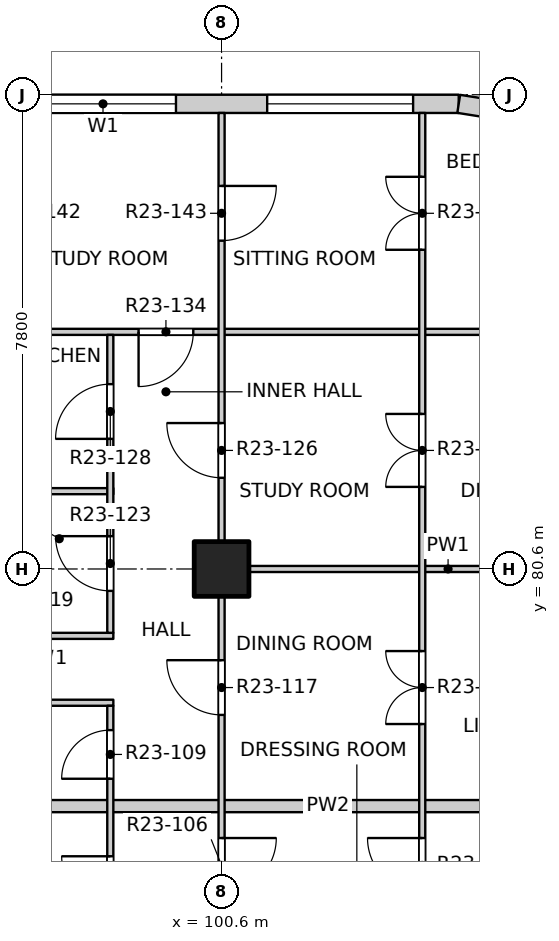
"""IFC4 building model, lengths in metres.
Left out: names, types, materials, properties, quantities, classifications, styles, units other than length and angle.
Written with IfcOpenShell. Run it as: python <this file> out.ifc"""

import sys

from ifc_helpers import new_model, si_unit, direction, frame, frame_2d, origin, origin_2d, place, context, subcontext, project, spatial, rectangle, extrude, element, fill, save


model = new_model("IFC4")
c1 = context("Model", 3, precision=1e-05, world=origin(), true_north=direction((0.0, 1.0)))
c2 = subcontext(c1, "Body", "Model", "MODEL_VIEW")
j1 = project(units=[si_unit("LENGTHUNIT", "METRE"), si_unit("PLANEANGLEUNIT", "RADIAN")], contexts=[c1])
p1 = place(None, origin())
s1 = spatial("IfcSite", under=j1, at=p1, CompositionType="ELEMENT")
p2 = place(p1, origin())
s2 = spatial("IfcBuilding", under=s1, at=p2, CompositionType="ELEMENT")
p3 = place(p2, frame((0.0, 0.0, 238.1)))
s3 = spatial("IfcBuildingStorey", under=s2, at=p3, CompositionType="ELEMENT", Elevation=238.1)
p4 = place(p3, frame((100.6, 80.6, -0.25), z_axis=(0.0, 0.0, 1.0), x_axis=(1.0, 0.0, 0.0)))
e1 = element("IfcColumn", 1, at=p4, inside=s3, PredefinedType="COLUMN", context=c2, shape_type="SweptSolid", body=[
    extrude(rectangle(XDim=0.9, YDim=0.9, at=origin_2d()), origin(), (0.0, 0.0, 1.0), 3.35),
])
p5 = place(p3, frame((97.1, 88.25, 0.0), z_axis=(0.0, 0.0, 1.0), x_axis=(1.0, 0.0, 0.0)))
e2 = element("IfcWall", 2, at=p5, inside=s3, PredefinedType="SOLIDWALL", context=c2, shape_type="SweptSolid", body=[
    extrude(rectangle(XDim=7.4, YDim=0.3, at=frame_2d((3.7, 0.0))), origin(), (0.0, 0.0, 1.0), 3.1),
])
p6 = place(p5, frame((0.35, 0.0, 0.9)))
e3 = element("IfcOpeningElement", 3, at=p6, cuts=e2, PredefinedType="OPENING", context=c2, shape_type="SweptSolid", body=[
    extrude(rectangle(XDim=2.4, YDim=1.8, at=frame_2d((1.2, 0.9))), frame((0.0, 0.16, 0.0), z_axis=(0.0, -1.0, 0.0), x_axis=(1.0, 0.0, 0.0)), (0.0, 0.0, 1.0), 0.32),
])
p7 = place(p5, frame((4.25, 0.0, 0.9)))
e4 = element("IfcOpeningElement", 4, at=p7, cuts=e2, PredefinedType="OPENING", context=c2, shape_type="SweptSolid", body=[
    extrude(rectangle(XDim=2.4, YDim=1.8, at=frame_2d((1.2, 0.9))), frame((0.0, 0.16, 0.0), z_axis=(0.0, -1.0, 0.0), x_axis=(1.0, 0.0, 0.0)), (0.0, 0.0, 1.0), 0.32),
])
p8 = place(p3, frame((105.659, 88.066, 0.0), z_axis=(0.0, 0.0, 1.0), x_axis=(-0.987678452879, 0.156496880861, 0.0)))
e5 = element("IfcWall", 5, at=p8, inside=s3, PredefinedType="SOLIDWALL", context=c2, shape_type="SweptSolid", body=[
    extrude(rectangle(XDim=1.173, YDim=0.3, at=frame_2d((0.586, 0.0))), origin(), (0.0, 0.0, 1.0), 3.1),
])
p9 = place(p3, frame((96.6, 76.7, 0.0), z_axis=(0.0, 0.0, 1.0), x_axis=(1.0, 0.0, 0.0)))
e6 = element("IfcWall", 6, at=p9, inside=s3, PredefinedType="PARTITIONING", context=c2, shape_type="SweptSolid", body=[
    extrude(rectangle(XDim=11.5, YDim=0.2, at=frame_2d((5.75, 0.0))), origin(), (0.0, 0.0, 1.0), 3.1),
])
for number, where, z_axis, x_axis in (
    (7, (96.6, 78.4, 0.0), (0.0, 0.0, 1.0), (1.0, 0.0, 0.0)),
    (8, (96.6, 79.5, 0.0), (0.0, 0.0, 1.0), (1.0, 0.0, 0.0)),
):
    element("IfcWall", number, at=place(p3, frame(where, z_axis=z_axis, x_axis=x_axis)), inside=s3, PredefinedType="PARTITIONING", context=c2, shape_type="SweptSolid", body=[
        extrude(rectangle(XDim=2.22, YDim=0.1, at=frame_2d((1.11, 0.0))), origin(), (0.0, 0.0, 1.0), 3.1),
    ])
p10 = place(p3, frame((100.55, 80.6, 0.0), z_axis=(0.0, 0.0, 1.0), x_axis=(1.0, 0.0, 0.0)))
e9 = element("IfcWall", 9, at=p10, inside=s3, PredefinedType="PARTITIONING", context=c2, shape_type="SweptSolid", body=[
    extrude(rectangle(XDim=7.55, YDim=0.1, at=frame_2d((3.775, 0.0))), origin(), (0.0, 0.0, 1.0), 3.1),
])
p11 = place(p3, frame((96.6, 81.88, 0.0), z_axis=(0.0, 0.0, 1.0), x_axis=(1.0, 0.0, 0.0)))
e10 = element("IfcWall", 10, at=p11, inside=s3, PredefinedType="PARTITIONING", context=c2, shape_type="SweptSolid", body=[
    extrude(rectangle(XDim=2.22, YDim=0.1, at=frame_2d((1.11, 0.0))), origin(), (0.0, 0.0, 1.0), 3.1),
])
p12 = place(p3, frame((96.6, 84.5, 0.0), z_axis=(0.0, 0.0, 1.0), x_axis=(1.0, 0.0, 0.0)))
e11 = element("IfcWall", 11, at=p12, inside=s3, PredefinedType="PARTITIONING", context=c2, shape_type="SweptSolid", body=[
    extrude(rectangle(XDim=11.5, YDim=0.1, at=frame_2d((5.75, 0.0))), origin(), (0.0, 0.0, 1.0), 3.1),
])
p13 = place(p12, frame((2.635, 0.0, 0.0)))
e12 = element("IfcOpeningElement", 12, at=p13, cuts=e11, PredefinedType="OPENING", context=c2, shape_type="SweptSolid", body=[
    extrude(rectangle(XDim=0.9, YDim=2.1, at=frame_2d((0.45, 1.05))), frame((0.0, 0.06, 0.0), z_axis=(0.0, -1.0, 0.0), x_axis=(1.0, 0.0, 0.0)), (0.0, 0.0, 1.0), 0.12),
])
p14 = place(p3, frame((98.77, 64.0, 0.0), z_axis=(0.0, 0.0, 1.0), x_axis=(0.0, 1.0, 0.0)))
e13 = element("IfcWall", 13, at=p14, inside=s3, PredefinedType="PARTITIONING", context=c2, shape_type="SweptSolid", body=[
    extrude(rectangle(XDim=14.35, YDim=0.1, at=frame_2d((7.175, 0.0))), origin(), (0.0, 0.0, 1.0), 3.1),
])
p15 = place(p14, frame((0.815, 0.0, 0.0)))
e14 = element("IfcOpeningElement", 14, at=p15, cuts=e13, PredefinedType="OPENING", context=c2, shape_type="SweptSolid", body=[
    extrude(rectangle(XDim=0.8, YDim=2.1, at=frame_2d((0.4, 1.05))), frame((0.0, 0.06, 0.0), z_axis=(0.0, -1.0, 0.0), x_axis=(1.0, 0.0, 0.0)), (0.0, 0.0, 1.0), 0.12),
])
p16 = place(p14, frame((3.23, 0.0, 0.0)))
e15 = element("IfcOpeningElement", 15, at=p16, cuts=e13, PredefinedType="OPENING", context=c2, shape_type="SweptSolid", body=[
    extrude(rectangle(XDim=0.9, YDim=2.1, at=frame_2d((0.45, 1.05))), frame((0.0, 0.06, 0.0), z_axis=(0.0, -1.0, 0.0), x_axis=(1.0, 0.0, 0.0)), (0.0, 0.0, 1.0), 0.12),
])
p17 = place(p14, frame((5.63, 0.0, 0.0)))
e16 = element("IfcOpeningElement", 16, at=p17, cuts=e13, PredefinedType="OPENING", context=c2, shape_type="SweptSolid", body=[
    extrude(rectangle(XDim=0.8, YDim=2.1, at=frame_2d((0.4, 1.05))), frame((0.0, 0.06, 0.0), z_axis=(0.0, -1.0, 0.0), x_axis=(1.0, 0.0, 0.0)), (0.0, 0.0, 1.0), 0.12),
])
p18 = place(p14, frame((8.265, 0.0, 0.0)))
e17 = element("IfcOpeningElement", 17, at=p18, cuts=e13, PredefinedType="OPENING", context=c2, shape_type="SweptSolid", body=[
    extrude(rectangle(XDim=0.9, YDim=2.1, at=frame_2d((0.45, 1.05))), frame((0.0, 0.06, 0.0), z_axis=(0.0, -1.0, 0.0), x_axis=(1.0, 0.0, 0.0)), (0.0, 0.0, 1.0), 0.12),
])
p19 = place(p14, frame((11.075, 0.0, 0.0)))
e18 = element("IfcOpeningElement", 18, at=p19, cuts=e13, PredefinedType="OPENING", context=c2, shape_type="SweptSolid", body=[
    extrude(rectangle(XDim=0.8, YDim=2.1, at=frame_2d((0.4, 1.05))), frame((0.0, 0.06, 0.0), z_axis=(0.0, -1.0, 0.0), x_axis=(1.0, 0.0, 0.0)), (0.0, 0.0, 1.0), 0.12),
])
p20 = place(p14, frame((13.15, 0.0, 0.0)))
e19 = element("IfcOpeningElement", 19, at=p20, cuts=e13, PredefinedType="OPENING", context=c2, shape_type="SweptSolid", body=[
    extrude(rectangle(XDim=0.8, YDim=2.1, at=frame_2d((0.4, 1.05))), frame((0.0, 0.06, 0.0), z_axis=(0.0, -1.0, 0.0), x_axis=(1.0, 0.0, 0.0)), (0.0, 0.0, 1.0), 0.12),
])
p21 = place(p3, frame((98.77, 79.55, 0.0), z_axis=(0.0, 0.0, 1.0), x_axis=(0.0, 1.0, 0.0)))
e20 = element("IfcWall", 20, at=p21, inside=s3, PredefinedType="PARTITIONING", context=c2, shape_type="SweptSolid", body=[
    extrude(rectangle(XDim=4.9, YDim=0.1, at=frame_2d((2.45, 0.0))), origin(), (0.0, 0.0, 1.0), 3.1),
])
p22 = place(p21, frame((0.69, 0.0, 0.0)))
e21 = element("IfcOpeningElement", 21, at=p22, cuts=e20, PredefinedType="OPENING", context=c2, shape_type="SweptSolid", body=[
    extrude(rectangle(XDim=0.9, YDim=2.1, at=frame_2d((0.45, 1.05))), frame((0.0, 0.06, 0.0), z_axis=(0.0, -1.0, 0.0), x_axis=(1.0, 0.0, 0.0)), (0.0, 0.0, 1.0), 0.12),
])
p23 = place(p21, frame((3.19, 0.0, 0.0)))
e22 = element("IfcOpeningElement", 22, at=p23, cuts=e20, PredefinedType="OPENING", context=c2, shape_type="SweptSolid", body=[
    extrude(rectangle(XDim=0.9, YDim=2.1, at=frame_2d((0.45, 1.05))), frame((0.0, 0.06, 0.0), z_axis=(0.0, -1.0, 0.0), x_axis=(1.0, 0.0, 0.0)), (0.0, 0.0, 1.0), 0.12),
])
p24 = place(p3, frame((100.6, 41.9, 0.0), z_axis=(0.0, 0.0, 1.0), x_axis=(0.0, 1.0, 0.0)))
e23 = element("IfcWall", 23, at=p24, inside=s3, PredefinedType="PARTITIONING", context=c2, shape_type="SweptSolid", body=[
    extrude(rectangle(XDim=46.2, YDim=0.1, at=frame_2d((23.1, 0.0))), origin(), (0.0, 0.0, 1.0), 3.1),
])
p25 = place(p24, frame((1.2, 0.0, 0.0)))
e24 = element("IfcOpeningElement", 24, at=p25, cuts=e23, PredefinedType="OPENING", context=c2, shape_type="SweptSolid", body=[
    extrude(rectangle(XDim=0.9, YDim=2.1, at=frame_2d((0.45, 1.05))), frame((0.0, 0.06, 0.0), z_axis=(0.0, -1.0, 0.0), x_axis=(1.0, 0.0, 0.0)), (0.0, 0.0, 1.0), 0.12),
])
p26 = place(p24, frame((6.025, 0.0, 0.0)))
e25 = element("IfcOpeningElement", 25, at=p26, cuts=e23, PredefinedType="OPENING", context=c2, shape_type="SweptSolid", body=[
    extrude(rectangle(XDim=0.9, YDim=2.1, at=frame_2d((0.45, 1.05))), frame((0.0, 0.06, 0.0), z_axis=(0.0, -1.0, 0.0), x_axis=(1.0, 0.0, 0.0)), (0.0, 0.0, 1.0), 0.12),
])
p27 = place(p24, frame((9.975, 0.0, 0.0)))
e26 = element("IfcOpeningElement", 26, at=p27, cuts=e23, PredefinedType="OPENING", context=c2, shape_type="SweptSolid", body=[
    extrude(rectangle(XDim=0.9, YDim=2.1, at=frame_2d((0.45, 1.05))), frame((0.0, 0.06, 0.0), z_axis=(0.0, -1.0, 0.0), x_axis=(1.0, 0.0, 0.0)), (0.0, 0.0, 1.0), 0.12),
])
p28 = place(p24, frame((12.9, 0.0, 0.0)))
e27 = element("IfcOpeningElement", 27, at=p28, cuts=e23, PredefinedType="OPENING", context=c2, shape_type="SweptSolid", body=[
    extrude(rectangle(XDim=0.9, YDim=2.1, at=frame_2d((0.45, 1.05))), frame((0.0, 0.06, 0.0), z_axis=(0.0, -1.0, 0.0), x_axis=(1.0, 0.0, 0.0)), (0.0, 0.0, 1.0), 0.12),
])
p29 = place(p24, frame((17.775, 0.0, 0.0)))
e28 = element("IfcOpeningElement", 28, at=p29, cuts=e23, PredefinedType="OPENING", context=c2, shape_type="SweptSolid", body=[
    extrude(rectangle(XDim=0.9, YDim=2.1, at=frame_2d((0.45, 1.05))), frame((0.0, 0.06, 0.0), z_axis=(0.0, -1.0, 0.0), x_axis=(1.0, 0.0, 0.0)), (0.0, 0.0, 1.0), 0.12),
])
p30 = place(p24, frame((21.625, 0.0, 0.0)))
e29 = element("IfcOpeningElement", 29, at=p30, cuts=e23, PredefinedType="OPENING", context=c2, shape_type="SweptSolid", body=[
    extrude(rectangle(XDim=0.9, YDim=2.1, at=frame_2d((0.45, 1.05))), frame((0.0, 0.06, 0.0), z_axis=(0.0, -1.0, 0.0), x_axis=(1.0, 0.0, 0.0)), (0.0, 0.0, 1.0), 0.12),
])
p31 = place(p24, frame((25.575, 0.0, 0.0)))
e30 = element("IfcOpeningElement", 30, at=p31, cuts=e23, PredefinedType="OPENING", context=c2, shape_type="SweptSolid", body=[
    extrude(rectangle(XDim=0.9, YDim=2.1, at=frame_2d((0.45, 1.05))), frame((0.0, 0.06, 0.0), z_axis=(0.0, -1.0, 0.0), x_axis=(1.0, 0.0, 0.0)), (0.0, 0.0, 1.0), 0.12),
])
p32 = place(p24, frame((28.5, 0.0, 0.0)))
e31 = element("IfcOpeningElement", 31, at=p32, cuts=e23, PredefinedType="OPENING", context=c2, shape_type="SweptSolid", body=[
    extrude(rectangle(XDim=0.9, YDim=2.1, at=frame_2d((0.45, 1.05))), frame((0.0, 0.06, 0.0), z_axis=(0.0, -1.0, 0.0), x_axis=(1.0, 0.0, 0.0)), (0.0, 0.0, 1.0), 0.12),
])
p33 = place(p24, frame((33.375, 0.0, 0.0)))
e32 = element("IfcOpeningElement", 32, at=p33, cuts=e23, PredefinedType="OPENING", context=c2, shape_type="SweptSolid", body=[
    extrude(rectangle(XDim=0.9, YDim=2.1, at=frame_2d((0.45, 1.05))), frame((0.0, 0.06, 0.0), z_axis=(0.0, -1.0, 0.0), x_axis=(1.0, 0.0, 0.0)), (0.0, 0.0, 1.0), 0.12),
])
p34 = place(p24, frame((36.3, 0.0, 0.0)))
e33 = element("IfcOpeningElement", 33, at=p34, cuts=e23, PredefinedType="OPENING", context=c2, shape_type="SweptSolid", body=[
    extrude(rectangle(XDim=0.9, YDim=2.1, at=frame_2d((0.45, 1.05))), frame((0.0, 0.06, 0.0), z_axis=(0.0, -1.0, 0.0), x_axis=(1.0, 0.0, 0.0)), (0.0, 0.0, 1.0), 0.12),
])
p35 = place(p24, frame((40.2, 0.0, 0.0)))
e34 = element("IfcOpeningElement", 34, at=p35, cuts=e23, PredefinedType="OPENING", context=c2, shape_type="SweptSolid", body=[
    extrude(rectangle(XDim=0.9, YDim=2.1, at=frame_2d((0.45, 1.05))), frame((0.0, 0.06, 0.0), z_axis=(0.0, -1.0, 0.0), x_axis=(1.0, 0.0, 0.0)), (0.0, 0.0, 1.0), 0.12),
])
p36 = place(p24, frame((44.1, 0.0, 0.0)))
e35 = element("IfcOpeningElement", 35, at=p36, cuts=e23, PredefinedType="OPENING", context=c2, shape_type="SweptSolid", body=[
    extrude(rectangle(XDim=0.9, YDim=2.1, at=frame_2d((0.45, 1.05))), frame((0.0, 0.06, 0.0), z_axis=(0.0, -1.0, 0.0), x_axis=(1.0, 0.0, 0.0)), (0.0, 0.0, 1.0), 0.12),
])
p37 = place(p3, frame((103.9, 61.2, 0.0), z_axis=(0.0, 0.0, 1.0), x_axis=(0.0, 1.0, 0.0)))
e36 = element("IfcWall", 36, at=p37, inside=s3, PredefinedType="PARTITIONING", context=c2, shape_type="SweptSolid", body=[
    extrude(rectangle(XDim=26.9, YDim=0.1, at=frame_2d((13.45, 0.0))), origin(), (0.0, 0.0, 1.0), 3.1),
])
p38 = place(p37, frame((0.425, 0.0, 0.0)))
e37 = element("IfcOpeningElement", 37, at=p38, cuts=e36, PredefinedType="OPENING", context=c2, shape_type="SweptSolid", body=[
    extrude(rectangle(XDim=0.9, YDim=2.1, at=frame_2d((0.45, 1.05))), frame((0.0, 0.06, 0.0), z_axis=(0.0, -1.0, 0.0), x_axis=(1.0, 0.0, 0.0)), (0.0, 0.0, 1.0), 0.12),
])
p39 = place(p37, frame((2.375, 0.0, 0.0)))
e38 = element("IfcOpeningElement", 38, at=p39, cuts=e36, PredefinedType="OPENING", context=c2, shape_type="SweptSolid", body=[
    extrude(rectangle(XDim=0.9, YDim=2.1, at=frame_2d((0.45, 1.05))), frame((0.0, 0.06, 0.0), z_axis=(0.0, -1.0, 0.0), x_axis=(1.0, 0.0, 0.0)), (0.0, 0.0, 1.0), 0.12),
])
p40 = place(p37, frame((4.325, 0.0, 0.0)))
e39 = element("IfcOpeningElement", 39, at=p40, cuts=e36, PredefinedType="OPENING", context=c2, shape_type="SweptSolid", body=[
    extrude(rectangle(XDim=0.9, YDim=2.1, at=frame_2d((0.45, 1.05))), frame((0.0, 0.06, 0.0), z_axis=(0.0, -1.0, 0.0), x_axis=(1.0, 0.0, 0.0)), (0.0, 0.0, 1.0), 0.12),
])
p41 = place(p37, frame((6.275, 0.0, 0.0)))
e40 = element("IfcOpeningElement", 40, at=p41, cuts=e36, PredefinedType="OPENING", context=c2, shape_type="SweptSolid", body=[
    extrude(rectangle(XDim=0.9, YDim=2.1, at=frame_2d((0.45, 1.05))), frame((0.0, 0.06, 0.0), z_axis=(0.0, -1.0, 0.0), x_axis=(1.0, 0.0, 0.0)), (0.0, 0.0, 1.0), 0.12),
])
p42 = place(p37, frame((9.05, 0.0, 0.0)))
e41 = element("IfcOpeningElement", 41, at=p42, cuts=e36, PredefinedType="OPENING", context=c2, shape_type="SweptSolid", body=[
    extrude(rectangle(XDim=1.2, YDim=2.1, at=frame_2d((0.6, 1.05))), frame((0.0, 0.06, 0.0), z_axis=(0.0, -1.0, 0.0), x_axis=(1.0, 0.0, 0.0)), (0.0, 0.0, 1.0), 0.12),
])
p43 = place(p37, frame((12.125, 0.0, 0.0)))
e42 = element("IfcOpeningElement", 42, at=p43, cuts=e36, PredefinedType="OPENING", context=c2, shape_type="SweptSolid", body=[
    extrude(rectangle(XDim=0.9, YDim=2.1, at=frame_2d((0.45, 1.05))), frame((0.0, 0.06, 0.0), z_axis=(0.0, -1.0, 0.0), x_axis=(1.0, 0.0, 0.0)), (0.0, 0.0, 1.0), 0.12),
])
p44 = place(p37, frame((14.075, 0.0, 0.0)))
e43 = element("IfcOpeningElement", 43, at=p44, cuts=e36, PredefinedType="OPENING", context=c2, shape_type="SweptSolid", body=[
    extrude(rectangle(XDim=0.9, YDim=2.1, at=frame_2d((0.45, 1.05))), frame((0.0, 0.06, 0.0), z_axis=(0.0, -1.0, 0.0), x_axis=(1.0, 0.0, 0.0)), (0.0, 0.0, 1.0), 0.12),
])
p45 = place(p37, frame((16.85, 0.0, 0.0)))
e44 = element("IfcOpeningElement", 44, at=p45, cuts=e36, PredefinedType="OPENING", context=c2, shape_type="SweptSolid", body=[
    extrude(rectangle(XDim=1.2, YDim=2.1, at=frame_2d((0.6, 1.05))), frame((0.0, 0.06, 0.0), z_axis=(0.0, -1.0, 0.0), x_axis=(1.0, 0.0, 0.0)), (0.0, 0.0, 1.0), 0.12),
])
p46 = place(p37, frame((20.75, 0.0, 0.0)))
e45 = element("IfcOpeningElement", 45, at=p46, cuts=e36, PredefinedType="OPENING", context=c2, shape_type="SweptSolid", body=[
    extrude(rectangle(XDim=1.2, YDim=2.1, at=frame_2d((0.6, 1.05))), frame((0.0, 0.06, 0.0), z_axis=(0.0, -1.0, 0.0), x_axis=(1.0, 0.0, 0.0)), (0.0, 0.0, 1.0), 0.12),
])
p47 = place(p37, frame((24.65, 0.0, 0.0)))
e46 = element("IfcOpeningElement", 46, at=p47, cuts=e36, PredefinedType="OPENING", context=c2, shape_type="SweptSolid", body=[
    extrude(rectangle(XDim=1.2, YDim=2.1, at=frame_2d((0.6, 1.05))), frame((0.0, 0.06, 0.0), z_axis=(0.0, -1.0, 0.0), x_axis=(1.0, 0.0, 0.0)), (0.0, 0.0, 1.0), 0.12),
])
p48 = place(p6, origin())
e47 = element("IfcWindow", 47, at=p48, inside=s3, PartitioningType="DOUBLE_PANEL_VERTICAL", PredefinedType="WINDOW", context=c2, shape_type="SweptSolid", body=[
    extrude(rectangle(XDim=2.4, YDim=1.8, at=frame_2d((1.2, 0.9))), frame((0.0, 0.03, 0.0), z_axis=(0.0, -1.0, 0.0), x_axis=(1.0, 0.0, 0.0)), (0.0, 0.0, 1.0), 0.06),
])
fill(e3, e47)
p49 = place(p7, origin())
e48 = element("IfcWindow", 48, at=p49, inside=s3, PartitioningType="DOUBLE_PANEL_VERTICAL", PredefinedType="WINDOW", context=c2, shape_type="SweptSolid", body=[
    extrude(rectangle(XDim=2.4, YDim=1.8, at=frame_2d((1.2, 0.9))), frame((0.0, 0.03, 0.0), z_axis=(0.0, -1.0, 0.0), x_axis=(1.0, 0.0, 0.0)), (0.0, 0.0, 1.0), 0.06),
])
fill(e4, e48)
p50 = place(p19, origin())
e49 = element("IfcDoor", 49, at=p50, inside=s3, OperationType="SINGLE_SWING_RIGHT", PredefinedType="DOOR", context=c2, shape_type="SweptSolid", body=[
    extrude(rectangle(XDim=0.8, YDim=2.1, at=frame_2d((0.4, 1.05))), frame((0.0, 0.025, 0.0), z_axis=(0.0, -1.0, 0.0), x_axis=(1.0, 0.0, 0.0)), (0.0, 0.0, 1.0), 0.05),
])
fill(e18, e49)
p51 = place(p33, origin())
e50 = element("IfcDoor", 50, at=p51, inside=s3, OperationType="SINGLE_SWING_LEFT", PredefinedType="DOOR", context=c2, shape_type="SweptSolid", body=[
    extrude(rectangle(XDim=0.9, YDim=2.1, at=frame_2d((0.45, 1.05))), frame((0.0, 0.025, 0.0), z_axis=(0.0, -1.0, 0.0), x_axis=(1.0, 0.0, 0.0)), (0.0, 0.0, 1.0), 0.05),
])
fill(e32, e50)
p52 = place(p44, origin())
e51 = element("IfcDoor", 51, at=p52, inside=s3, OperationType="SINGLE_SWING_RIGHT", PredefinedType="DOOR", context=c2, shape_type="SweptSolid", body=[
    extrude(rectangle(XDim=0.9, YDim=2.1, at=frame_2d((0.45, 1.05))), frame((0.0, 0.025, 0.0), z_axis=(0.0, -1.0, 0.0), x_axis=(1.0, 0.0, 0.0)), (0.0, 0.0, 1.0), 0.05),
])
fill(e43, e51)
p53 = place(p20, origin())
e52 = element("IfcDoor", 52, at=p53, inside=s3, OperationType="SINGLE_SWING_LEFT", PredefinedType="DOOR", context=c2, shape_type="SweptSolid", body=[
    extrude(rectangle(XDim=0.8, YDim=2.1, at=frame_2d((0.4, 1.05))), frame((0.0, 0.025, 0.0), z_axis=(0.0, -1.0, 0.0), x_axis=(1.0, 0.0, 0.0)), (0.0, 0.0, 1.0), 0.05),
])
fill(e19, e52)
p54 = place(p34, origin())
e53 = element("IfcDoor", 53, at=p54, inside=s3, OperationType="SINGLE_SWING_RIGHT", PredefinedType="DOOR", context=c2, shape_type="SweptSolid", body=[
    extrude(rectangle(XDim=0.9, YDim=2.1, at=frame_2d((0.45, 1.05))), frame((0.0, 0.025, 0.0), z_axis=(0.0, -1.0, 0.0), x_axis=(1.0, 0.0, 0.0)), (0.0, 0.0, 1.0), 0.05),
])
fill(e33, e53)
p55 = place(p45, origin())
e54 = element("IfcDoor", 54, at=p55, inside=s3, OperationType="DOUBLE_DOOR_SINGLE_SWING", PredefinedType="DOOR", context=c2, shape_type="SweptSolid", body=[
    extrude(rectangle(XDim=1.2, YDim=2.1, at=frame_2d((0.6, 1.05))), frame((0.0, 0.025, 0.0), z_axis=(0.0, -1.0, 0.0), x_axis=(1.0, 0.0, 0.0)), (0.0, 0.0, 1.0), 0.05),
])
fill(e44, e54)
p56 = place(p22, origin())
e55 = element("IfcDoor", 55, at=p56, inside=s3, OperationType="SINGLE_SWING_RIGHT", PredefinedType="DOOR", context=c2, shape_type="SweptSolid", body=[
    extrude(rectangle(XDim=0.9, YDim=2.1, at=frame_2d((0.45, 1.05))), frame((0.0, 0.025, 0.0), z_axis=(0.0, -1.0, 0.0), x_axis=(1.0, 0.0, 0.0)), (0.0, 0.0, 1.0), 0.05),
])
fill(e21, e55)
p57 = place(p35, origin())
e56 = element("IfcDoor", 56, at=p57, inside=s3, OperationType="SINGLE_SWING_RIGHT", PredefinedType="DOOR", context=c2, shape_type="SweptSolid", body=[
    extrude(rectangle(XDim=0.9, YDim=2.1, at=frame_2d((0.45, 1.05))), frame((0.0, 0.025, 0.0), z_axis=(0.0, -1.0, 0.0), x_axis=(1.0, 0.0, 0.0)), (0.0, 0.0, 1.0), 0.05),
])
fill(e34, e56)
p58 = place(p46, origin())
e57 = element("IfcDoor", 57, at=p58, inside=s3, OperationType="DOUBLE_DOOR_SINGLE_SWING", PredefinedType="DOOR", context=c2, shape_type="SweptSolid", body=[
    extrude(rectangle(XDim=1.2, YDim=2.1, at=frame_2d((0.6, 1.05))), frame((0.0, 0.025, 0.0), z_axis=(0.0, -1.0, 0.0), x_axis=(1.0, 0.0, 0.0)), (0.0, 0.0, 1.0), 0.05),
])
fill(e45, e57)
p59 = place(p23, origin())
e58 = element("IfcDoor", 58, at=p59, inside=s3, OperationType="SINGLE_SWING_LEFT", PredefinedType="DOOR", context=c2, shape_type="SweptSolid", body=[
    extrude(rectangle(XDim=0.9, YDim=2.1, at=frame_2d((0.45, 1.05))), frame((0.0, 0.025, 0.0), z_axis=(0.0, -1.0, 0.0), x_axis=(1.0, 0.0, 0.0)), (0.0, 0.0, 1.0), 0.05),
])
fill(e22, e58)
p60 = place(p13, origin())
e59 = element("IfcDoor", 59, at=p60, inside=s3, OperationType="SINGLE_SWING_RIGHT", PredefinedType="DOOR", context=c2, shape_type="SweptSolid", body=[
    extrude(rectangle(XDim=0.9, YDim=2.1, at=frame_2d((0.45, 1.05))), frame((0.0, 0.025, 0.0), z_axis=(0.0, -1.0, 0.0), x_axis=(1.0, 0.0, 0.0)), (0.0, 0.0, 1.0), 0.05),
])
fill(e12, e59)
p61 = place(p36, origin())
e60 = element("IfcDoor", 60, at=p61, inside=s3, OperationType="SINGLE_SWING_LEFT", PredefinedType="DOOR", context=c2, shape_type="SweptSolid", body=[
    extrude(rectangle(XDim=0.9, YDim=2.1, at=frame_2d((0.45, 1.05))), frame((0.0, 0.025, 0.0), z_axis=(0.0, -1.0, 0.0), x_axis=(1.0, 0.0, 0.0)), (0.0, 0.0, 1.0), 0.05),
])
fill(e35, e60)
p62 = place(p47, origin())
e61 = element("IfcDoor", 61, at=p62, inside=s3, OperationType="DOUBLE_DOOR_SINGLE_SWING", PredefinedType="DOOR", context=c2, shape_type="SweptSolid", body=[
    extrude(rectangle(XDim=1.2, YDim=2.1, at=frame_2d((0.6, 1.05))), frame((0.0, 0.025, 0.0), z_axis=(0.0, -1.0, 0.0), x_axis=(1.0, 0.0, 0.0)), (0.0, 0.0, 1.0), 0.05),
])
fill(e46, e61)
save(model, sys.argv[1])
